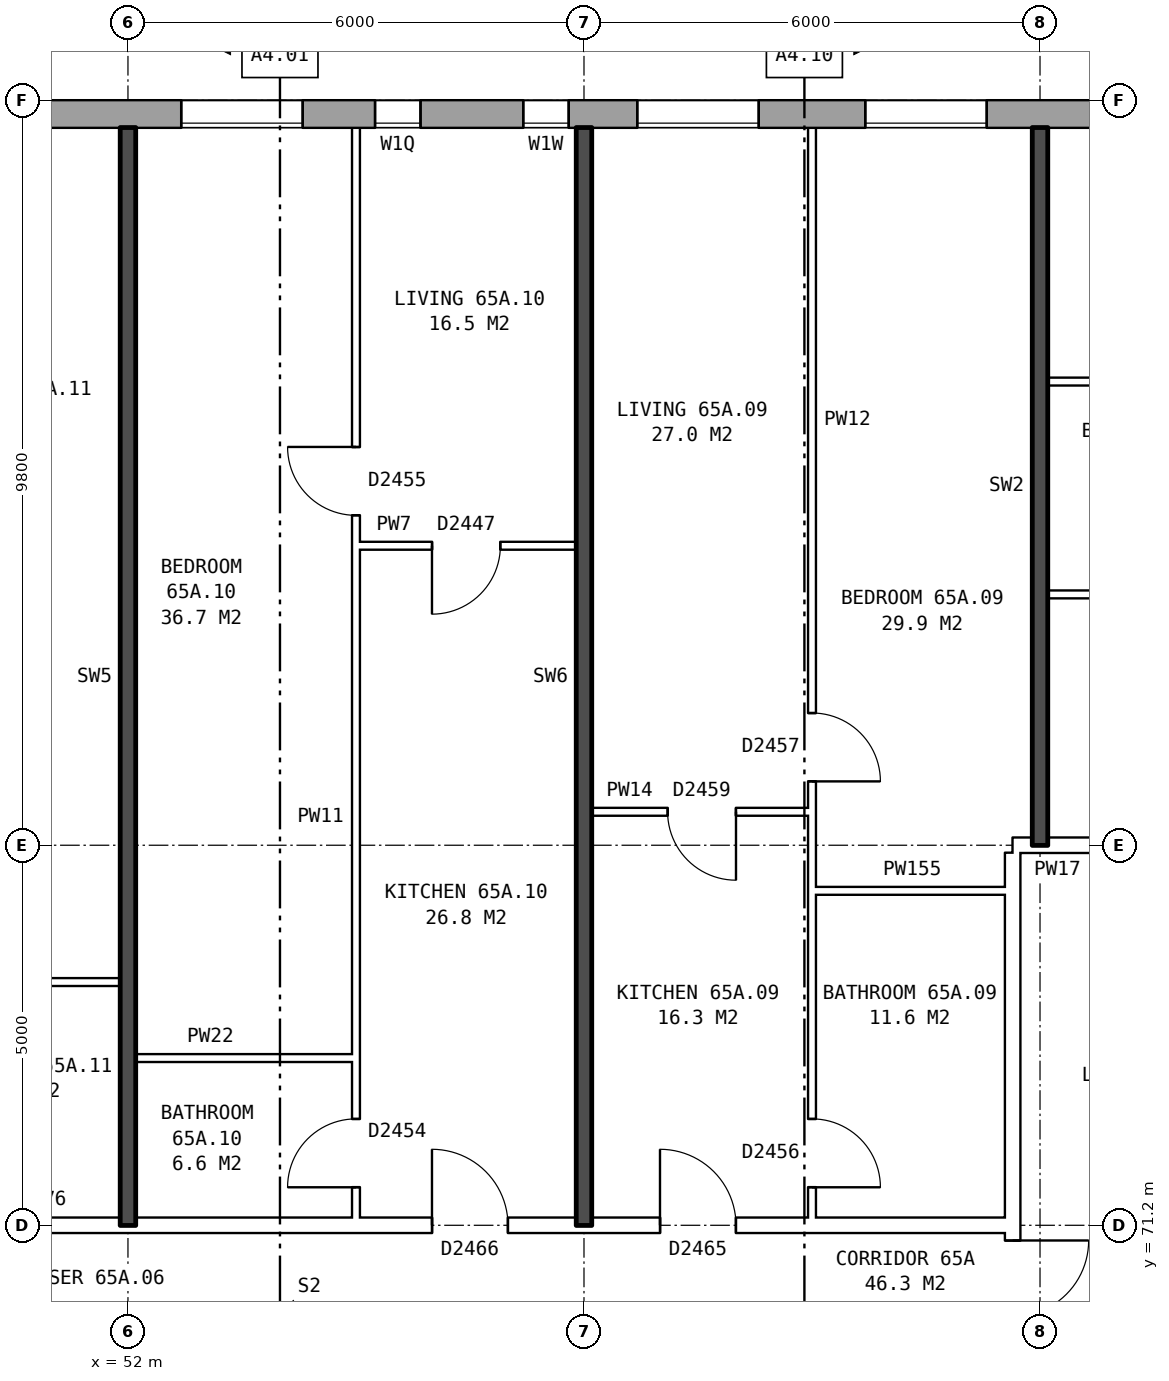
"""IFC4 building model, lengths in metres.
Left out: names, types, materials, properties, quantities, classifications, styles, units other than length and angle.
Written with IfcOpenShell. Run it as: python <this file> out.ifc"""

import sys

from ifc_helpers import new_model, si_unit, direction, frame, frame_2d, origin, place, context, subcontext, project, spatial, rectangle, extrude, element, fill, save


model = new_model("IFC4")
c1 = context("Model", 3, precision=1e-05, world=origin(), true_north=direction((0.0, 1.0)))
c2 = subcontext(c1, "Body", "Model", "MODEL_VIEW")
j1 = project(units=[si_unit("LENGTHUNIT", "METRE"), si_unit("PLANEANGLEUNIT", "RADIAN")], contexts=[c1])
p1 = place(None, origin())
s1 = spatial("IfcSite", under=j1, at=p1, CompositionType="ELEMENT")
p2 = place(p1, origin())
s2 = spatial("IfcBuilding", under=s1, at=p2, CompositionType="ELEMENT")
p3 = place(p2, frame((0.0, 0.0, 230.7)))
s3 = spatial("IfcBuildingStorey", under=s2, at=p3, CompositionType="ELEMENT", Elevation=230.7)
p4 = place(p3, frame((74.95, 85.82, 0.0), z_axis=(0.0, 0.0, 1.0), x_axis=(-1.0, 0.0, 0.0)))
e1 = element("IfcWall", 1, at=p4, inside=s3, PredefinedType="STANDARD", context=c2, shape_type="SweptSolid", body=[
    extrude(rectangle(XDim=39.875, YDim=0.36, at=frame_2d((19.938, 0.0))), origin(), (0.0, 0.0, 1.0), 2.85),
])
p5 = place(p4, frame((2.65, 0.0, 0.8)))
e2 = element("IfcOpeningElement", 2, at=p5, cuts=e1, PredefinedType="OPENING", context=c2, shape_type="SweptSolid", body=[
    extrude(rectangle(XDim=1.6, YDim=1.8, at=frame_2d((0.8, 0.9))), frame((0.0, 0.19, 0.0), z_axis=(0.0, -1.0, 0.0), x_axis=(1.0, 0.0, 0.0)), (0.0, 0.0, 1.0), 0.38),
])
p6 = place(p4, frame((5.65, 0.0, 0.8)))
e3 = element("IfcOpeningElement", 3, at=p6, cuts=e1, PredefinedType="OPENING", context=c2, shape_type="SweptSolid", body=[
    extrude(rectangle(XDim=1.6, YDim=1.8, at=frame_2d((0.8, 0.9))), frame((0.0, 0.19, 0.0), z_axis=(0.0, -1.0, 0.0), x_axis=(1.0, 0.0, 0.0)), (0.0, 0.0, 1.0), 0.38),
])
p7 = place(p4, frame((8.65, 0.0, 0.8)))
e4 = element("IfcOpeningElement", 4, at=p7, cuts=e1, PredefinedType="OPENING", context=c2, shape_type="SweptSolid", body=[
    extrude(rectangle(XDim=1.6, YDim=1.8, at=frame_2d((0.8, 0.9))), frame((0.0, 0.19, 0.0), z_axis=(0.0, -1.0, 0.0), x_axis=(1.0, 0.0, 0.0)), (0.0, 0.0, 1.0), 0.38),
])
p8 = place(p4, frame((11.65, 0.0, 0.8)))
e5 = element("IfcOpeningElement", 5, at=p8, cuts=e1, PredefinedType="OPENING", context=c2, shape_type="SweptSolid", body=[
    extrude(rectangle(XDim=1.6, YDim=1.8, at=frame_2d((0.8, 0.9))), frame((0.0, 0.19, 0.0), z_axis=(0.0, -1.0, 0.0), x_axis=(1.0, 0.0, 0.0)), (0.0, 0.0, 1.0), 0.38),
])
p9 = place(p4, frame((14.65, 0.0, 0.8)))
e6 = element("IfcOpeningElement", 6, at=p9, cuts=e1, PredefinedType="OPENING", context=c2, shape_type="SweptSolid", body=[
    extrude(rectangle(XDim=1.6, YDim=1.8, at=frame_2d((0.8, 0.9))), frame((0.0, 0.19, 0.0), z_axis=(0.0, -1.0, 0.0), x_axis=(1.0, 0.0, 0.0)), (0.0, 0.0, 1.0), 0.38),
])
p10 = place(p4, frame((17.15, 0.0, 1.7)))
e7 = element("IfcOpeningElement", 7, at=p10, cuts=e1, PredefinedType="OPENING", context=c2, shape_type="SweptSolid", body=[
    extrude(rectangle(XDim=0.6, YDim=0.9, at=frame_2d((0.3, 0.45))), frame((0.0, 0.19, 0.0), z_axis=(0.0, -1.0, 0.0), x_axis=(1.0, 0.0, 0.0)), (0.0, 0.0, 1.0), 0.38),
])
p11 = place(p4, frame((20.65, 0.0, 0.8)))
e8 = element("IfcOpeningElement", 8, at=p11, cuts=e1, PredefinedType="OPENING", context=c2, shape_type="SweptSolid", body=[
    extrude(rectangle(XDim=1.6, YDim=1.8, at=frame_2d((0.8, 0.9))), frame((0.0, 0.19, 0.0), z_axis=(0.0, -1.0, 0.0), x_axis=(1.0, 0.0, 0.0)), (0.0, 0.0, 1.0), 0.38),
])
p12 = place(p4, frame((24.7, 0.0, 0.8)))
e9 = element("IfcOpeningElement", 9, at=p12, cuts=e1, PredefinedType="OPENING", context=c2, shape_type="SweptSolid", body=[
    extrude(rectangle(XDim=1.0, YDim=1.8, at=frame_2d((0.5, 0.9))), frame((0.0, 0.19, 0.0), z_axis=(0.0, -1.0, 0.0), x_axis=(1.0, 0.0, 0.0)), (0.0, 0.0, 1.0), 0.38),
])
p13 = place(p4, frame((26.65, 0.0, 0.8)))
e10 = element("IfcOpeningElement", 10, at=p13, cuts=e1, PredefinedType="OPENING", context=c2, shape_type="SweptSolid", body=[
    extrude(rectangle(XDim=1.6, YDim=1.8, at=frame_2d((0.8, 0.9))), frame((0.0, 0.19, 0.0), z_axis=(0.0, -1.0, 0.0), x_axis=(1.0, 0.0, 0.0)), (0.0, 0.0, 1.0), 0.38),
])
p14 = place(p4, frame((29.65, 0.0, 0.8)))
e11 = element("IfcOpeningElement", 11, at=p14, cuts=e1, PredefinedType="OPENING", context=c2, shape_type="SweptSolid", body=[
    extrude(rectangle(XDim=1.6, YDim=1.8, at=frame_2d((0.8, 0.9))), frame((0.0, 0.19, 0.0), z_axis=(0.0, -1.0, 0.0), x_axis=(1.0, 0.0, 0.0)), (0.0, 0.0, 1.0), 0.38),
])
p15 = place(p4, frame((32.65, 0.0, 0.8)))
e12 = element("IfcOpeningElement", 12, at=p15, cuts=e1, PredefinedType="OPENING", context=c2, shape_type="SweptSolid", body=[
    extrude(rectangle(XDim=1.6, YDim=1.8, at=frame_2d((0.8, 0.9))), frame((0.0, 0.19, 0.0), z_axis=(0.0, -1.0, 0.0), x_axis=(1.0, 0.0, 0.0)), (0.0, 0.0, 1.0), 0.38),
])
p16 = place(p4, frame((35.65, 0.0, 0.8)))
e13 = element("IfcOpeningElement", 13, at=p16, cuts=e1, PredefinedType="OPENING", context=c2, shape_type="SweptSolid", body=[
    extrude(rectangle(XDim=1.6, YDim=1.8, at=frame_2d((0.8, 0.9))), frame((0.0, 0.19, 0.0), z_axis=(0.0, -1.0, 0.0), x_axis=(1.0, 0.0, 0.0)), (0.0, 0.0, 1.0), 0.38),
])
p17 = place(p4, frame((19.1, 0.0, 0.8)))
e14 = element("IfcOpeningElement", 14, at=p17, cuts=e1, PredefinedType="OPENING", context=c2, shape_type="SweptSolid", body=[
    extrude(rectangle(XDim=0.6, YDim=1.2, at=frame_2d((0.3, 0.6))), frame((0.0, 0.19, 0.0), z_axis=(0.0, -1.0, 0.0), x_axis=(1.0, 0.0, 0.0)), (0.0, 0.0, 1.0), 0.38),
])
p18 = place(p3, frame((63.64, 63.9, 0.0), z_axis=(0.0, 0.0, 1.0), x_axis=(0.0, 1.0, 0.0)))
e15 = element("IfcWall", 15, at=p18, inside=s3, PredefinedType="PARTITIONING", context=c2, shape_type="SweptSolid", body=[
    extrude(rectangle(XDim=12.2, YDim=0.2, at=frame_2d((6.1, 0.0))), origin(), (0.0, 0.0, 1.0), 2.85),
])
p19 = place(p18, frame((5.1, 0.0, 0.0)))
e16 = element("IfcOpeningElement", 16, at=p19, cuts=e15, PredefinedType="OPENING", context=c2, shape_type="SweptSolid", body=[
    extrude(rectangle(XDim=2.0, YDim=2.1, at=frame_2d((1.0, 1.05))), frame((0.0, 0.11, 0.0), z_axis=(0.0, -1.0, 0.0), x_axis=(1.0, 0.0, 0.0)), (0.0, 0.0, 1.0), 0.22),
])
p20 = place(p3, frame((44.36, 71.2, 0.0), z_axis=(0.0, 0.0, 1.0), x_axis=(1.0, 0.0, 0.0)))
e17 = element("IfcWall", 17, at=p20, inside=s3, PredefinedType="PARTITIONING", context=c2, shape_type="SweptSolid", body=[
    extrude(rectangle(XDim=19.28, YDim=0.2, at=frame_2d((9.64, 0.0))), origin(), (0.0, 0.0, 1.0), 2.85),
])
p21 = place(p20, frame((14.64, 0.0, 0.0)))
e18 = element("IfcOpeningElement", 18, at=p21, cuts=e17, PredefinedType="OPENING", context=c2, shape_type="SweptSolid", body=[
    extrude(rectangle(XDim=1.0, YDim=2.1, at=frame_2d((0.5, 1.05))), frame((0.0, 0.11, 0.0), z_axis=(0.0, -1.0, 0.0), x_axis=(1.0, 0.0, 0.0)), (0.0, 0.0, 1.0), 0.22),
])
p22 = place(p20, frame((11.64, 0.0, 0.0)))
e19 = element("IfcOpeningElement", 19, at=p22, cuts=e17, PredefinedType="OPENING", context=c2, shape_type="SweptSolid", body=[
    extrude(rectangle(XDim=1.0, YDim=2.1, at=frame_2d((0.5, 1.05))), frame((0.0, 0.11, 0.0), z_axis=(0.0, -1.0, 0.0), x_axis=(1.0, 0.0, 0.0)), (0.0, 0.0, 1.0), 0.22),
])
p23 = place(p20, frame((2.64, 0.0, 0.0)))
e20 = element("IfcOpeningElement", 20, at=p23, cuts=e17, PredefinedType="OPENING", context=c2, shape_type="SweptSolid", body=[
    extrude(rectangle(XDim=1.0, YDim=2.1, at=frame_2d((0.5, 1.05))), frame((0.0, 0.11, 0.0), z_axis=(0.0, -1.0, 0.0), x_axis=(1.0, 0.0, 0.0)), (0.0, 0.0, 1.0), 0.22),
])
for number, where, z_axis, x_axis in (
    (21, (52.1, 73.4, 0.0), (0.0, 0.0, 1.0), (1.0, 0.0, 0.0)),
    (22, (49.0, 74.4, 0.0), (0.0, 0.0, 1.0), (1.0, 0.0, 0.0)),
):
    element("IfcWall", number, at=place(p3, frame(where, z_axis=z_axis, x_axis=x_axis)), inside=s3, PredefinedType="PARTITIONING", context=c2, shape_type="SweptSolid", body=[
        extrude(rectangle(XDim=2.9, YDim=0.1, at=frame_2d((1.45, 0.0))), origin(), (0.0, 0.0, 1.0), 2.85),
    ])
p24 = place(p3, frame((61.0, 75.6, 0.0), z_axis=(0.0, 0.0, 1.0), x_axis=(1.0, 0.0, 0.0)))
e23 = element("IfcWall", 23, at=p24, inside=s3, PredefinedType="PARTITIONING", context=c2, shape_type="SweptSolid", body=[
    extrude(rectangle(XDim=2.64, YDim=0.1, at=frame_2d((1.32, 0.0))), origin(), (0.0, 0.0, 1.0), 2.85),
])
p25 = place(p3, frame((63.64, 76.2, 0.0), z_axis=(0.0, 0.0, 1.0), x_axis=(1.0, 0.0, 0.0)))
e24 = element("IfcWall", 24, at=p25, inside=s3, PredefinedType="PARTITIONING", context=c2, shape_type="SweptSolid", body=[
    extrude(rectangle(XDim=3.0, YDim=0.2, at=frame_2d((1.5, 0.0))), origin(), (0.0, 0.0, 1.0), 2.85),
])
p26 = place(p25, frame((1.18, 0.0, 0.0)))
e25 = element("IfcOpeningElement", 25, at=p26, cuts=e24, PredefinedType="OPENING", context=c2, shape_type="SweptSolid", body=[
    extrude(rectangle(XDim=1.0, YDim=2.1, at=frame_2d((0.5, 1.05))), frame((0.0, 0.11, 0.0), z_axis=(0.0, -1.0, 0.0), x_axis=(1.0, 0.0, 0.0)), (0.0, 0.0, 1.0), 0.22),
])
p27 = place(p3, frame((58.1, 76.64, 0.0), z_axis=(0.0, 0.0, 1.0), x_axis=(1.0, 0.0, 0.0)))
e26 = element("IfcWall", 26, at=p27, inside=s3, PredefinedType="PARTITIONING", context=c2, shape_type="SweptSolid", body=[
    extrude(rectangle(XDim=2.9, YDim=0.1, at=frame_2d((1.45, 0.0))), origin(), (0.0, 0.0, 1.0), 2.85),
])
p28 = place(p27, frame((1.0, 0.0, 0.0)))
e27 = element("IfcOpeningElement", 27, at=p28, cuts=e26, PredefinedType="OPENING", context=c2, shape_type="SweptSolid", body=[
    extrude(rectangle(XDim=0.9, YDim=2.1, at=frame_2d((0.45, 1.05))), frame((0.0, 0.06, 0.0), z_axis=(0.0, -1.0, 0.0), x_axis=(1.0, 0.0, 0.0)), (0.0, 0.0, 1.0), 0.12),
])
p29 = place(p3, frame((64.1, 79.5, 0.0), z_axis=(0.0, 0.0, 1.0), x_axis=(1.0, 0.0, 0.0)))
e28 = element("IfcWall", 28, at=p29, inside=s3, PredefinedType="PARTITIONING", context=c2, shape_type="SweptSolid", body=[
    extrude(rectangle(XDim=11.8, YDim=0.1, at=frame_2d((5.9, 0.0))), origin(), (0.0, 0.0, 1.0), 2.85),
])
p30 = place(p29, frame((3.65, 0.0, 0.0)))
e29 = element("IfcOpeningElement", 29, at=p30, cuts=e28, PredefinedType="OPENING", context=c2, shape_type="SweptSolid", body=[
    extrude(rectangle(XDim=0.9, YDim=2.1, at=frame_2d((0.45, 1.05))), frame((0.0, 0.06, 0.0), z_axis=(0.0, -1.0, 0.0), x_axis=(1.0, 0.0, 0.0)), (0.0, 0.0, 1.0), 0.12),
])
p31 = place(p29, frame((0.7, 0.0, 0.0)))
e30 = element("IfcOpeningElement", 30, at=p31, cuts=e28, PredefinedType="OPENING", context=c2, shape_type="SweptSolid", body=[
    extrude(rectangle(XDim=0.9, YDim=2.1, at=frame_2d((0.45, 1.05))), frame((0.0, 0.06, 0.0), z_axis=(0.0, -1.0, 0.0), x_axis=(1.0, 0.0, 0.0)), (0.0, 0.0, 1.0), 0.12),
])
p32 = place(p3, frame((55.0, 80.14, 0.0), z_axis=(0.0, 0.0, 1.0), x_axis=(1.0, 0.0, 0.0)))
e31 = element("IfcWall", 31, at=p32, inside=s3, PredefinedType="PARTITIONING", context=c2, shape_type="SweptSolid", body=[
    extrude(rectangle(XDim=2.9, YDim=0.1, at=frame_2d((1.45, 0.0))), origin(), (0.0, 0.0, 1.0), 2.85),
])
p33 = place(p32, frame((1.0, 0.0, 0.0)))
e32 = element("IfcOpeningElement", 32, at=p33, cuts=e31, PredefinedType="OPENING", context=c2, shape_type="SweptSolid", body=[
    extrude(rectangle(XDim=0.9, YDim=2.1, at=frame_2d((0.45, 1.05))), frame((0.0, 0.06, 0.0), z_axis=(0.0, -1.0, 0.0), x_axis=(1.0, 0.0, 0.0)), (0.0, 0.0, 1.0), 0.12),
])
p34 = place(p3, frame((64.1, 82.3, 0.0), z_axis=(0.0, 0.0, 1.0), x_axis=(1.0, 0.0, 0.0)))
e33 = element("IfcWall", 33, at=p34, inside=s3, PredefinedType="PARTITIONING", context=c2, shape_type="SweptSolid", body=[
    extrude(rectangle(XDim=2.3, YDim=0.1, at=frame_2d((1.15, 0.0))), origin(), (0.0, 0.0, 1.0), 2.85),
])
p35 = place(p3, frame((52.0, 71.2, 0.0), z_axis=(0.0, 0.0, 1.0), x_axis=(0.0, 1.0, 0.0)))
e34 = element("IfcWall", 34, at=p35, inside=s3, PredefinedType="SOLIDWALL", context=c2, shape_type="SweptSolid", body=[
    extrude(rectangle(XDim=14.44, YDim=0.2, at=frame_2d((7.22, 0.0))), origin(), (0.0, 0.0, 1.0), 2.85),
])
p36 = place(p3, frame((55.0, 71.3, 0.0), z_axis=(0.0, 0.0, 1.0), x_axis=(0.0, 1.0, 0.0)))
e35 = element("IfcWall", 35, at=p36, inside=s3, PredefinedType="PARTITIONING", context=c2, shape_type="SweptSolid", body=[
    extrude(rectangle(XDim=14.34, YDim=0.1, at=frame_2d((7.17, 0.0))), origin(), (0.0, 0.0, 1.0), 2.85),
])
p37 = place(p36, frame((9.24, 0.0, 0.0)))
e36 = element("IfcOpeningElement", 36, at=p37, cuts=e35, PredefinedType="OPENING", context=c2, shape_type="SweptSolid", body=[
    extrude(rectangle(XDim=0.9, YDim=2.1, at=frame_2d((0.45, 1.05))), frame((0.0, 0.06, 0.0), z_axis=(0.0, -1.0, 0.0), x_axis=(1.0, 0.0, 0.0)), (0.0, 0.0, 1.0), 0.12),
])
p38 = place(p36, frame((0.4, 0.0, 0.0)))
e37 = element("IfcOpeningElement", 37, at=p38, cuts=e35, PredefinedType="OPENING", context=c2, shape_type="SweptSolid", body=[
    extrude(rectangle(XDim=0.9, YDim=2.1, at=frame_2d((0.45, 1.05))), frame((0.0, 0.06, 0.0), z_axis=(0.0, -1.0, 0.0), x_axis=(1.0, 0.0, 0.0)), (0.0, 0.0, 1.0), 0.12),
])
p39 = place(p3, frame((58.0, 71.2, 0.0), z_axis=(0.0, 0.0, 1.0), x_axis=(0.0, 1.0, 0.0)))
e38 = element("IfcWall", 38, at=p39, inside=s3, PredefinedType="SOLIDWALL", context=c2, shape_type="SweptSolid", body=[
    extrude(rectangle(XDim=14.44, YDim=0.2, at=frame_2d((7.22, 0.0))), origin(), (0.0, 0.0, 1.0), 2.85),
])
p40 = place(p3, frame((61.0, 71.3, 0.0), z_axis=(0.0, 0.0, 1.0), x_axis=(0.0, 1.0, 0.0)))
e39 = element("IfcWall", 39, at=p40, inside=s3, PredefinedType="PARTITIONING", context=c2, shape_type="SweptSolid", body=[
    extrude(rectangle(XDim=14.34, YDim=0.1, at=frame_2d((7.17, 0.0))), origin(), (0.0, 0.0, 1.0), 2.85),
])
p41 = place(p40, frame((5.74, 0.0, 0.0)))
e40 = element("IfcOpeningElement", 40, at=p41, cuts=e39, PredefinedType="OPENING", context=c2, shape_type="SweptSolid", body=[
    extrude(rectangle(XDim=0.9, YDim=2.1, at=frame_2d((0.45, 1.05))), frame((0.0, 0.06, 0.0), z_axis=(0.0, -1.0, 0.0), x_axis=(1.0, 0.0, 0.0)), (0.0, 0.0, 1.0), 0.12),
])
p42 = place(p40, frame((0.4, 0.0, 0.0)))
e41 = element("IfcOpeningElement", 41, at=p42, cuts=e39, PredefinedType="OPENING", context=c2, shape_type="SweptSolid", body=[
    extrude(rectangle(XDim=0.9, YDim=2.1, at=frame_2d((0.45, 1.05))), frame((0.0, 0.06, 0.0), z_axis=(0.0, -1.0, 0.0), x_axis=(1.0, 0.0, 0.0)), (0.0, 0.0, 1.0), 0.12),
])
p43 = place(p3, frame((64.0, 76.2, 0.0), z_axis=(0.0, 0.0, 1.0), x_axis=(0.0, 1.0, 0.0)))
e42 = element("IfcWall", 42, at=p43, inside=s3, PredefinedType="SOLIDWALL", context=c2, shape_type="SweptSolid", body=[
    extrude(rectangle(XDim=9.44, YDim=0.2, at=frame_2d((4.72, 0.0))), origin(), (0.0, 0.0, 1.0), 2.85),
])
p44 = place(p8, origin())
e43 = element("IfcWindow", 43, at=p44, inside=s3, PartitioningType="SINGLE_PANEL", PredefinedType="WINDOW", context=c2, shape_type="SweptSolid", body=[
    extrude(rectangle(XDim=1.6, YDim=1.8, at=frame_2d((0.8, 0.9))), frame((0.0, 0.15, 0.0), z_axis=(0.0, -1.0, 0.0), x_axis=(1.0, 0.0, 0.0)), (0.0, 0.0, 1.0), 0.06),
])
fill(e5, e43)
p45 = place(p9, origin())
e44 = element("IfcWindow", 44, at=p45, inside=s3, PartitioningType="SINGLE_PANEL", PredefinedType="WINDOW", context=c2, shape_type="SweptSolid", body=[
    extrude(rectangle(XDim=1.6, YDim=1.8, at=frame_2d((0.8, 0.9))), frame((0.0, 0.15, 0.0), z_axis=(0.0, -1.0, 0.0), x_axis=(1.0, 0.0, 0.0)), (0.0, 0.0, 1.0), 0.06),
])
fill(e6, e44)
p46 = place(p10, origin())
e45 = element("IfcWindow", 45, at=p46, inside=s3, PartitioningType="SINGLE_PANEL", PredefinedType="WINDOW", context=c2, shape_type="SweptSolid", body=[
    extrude(rectangle(XDim=0.6, YDim=0.9, at=frame_2d((0.3, 0.45))), frame((0.0, 0.15, 0.0), z_axis=(0.0, -1.0, 0.0), x_axis=(1.0, 0.0, 0.0)), (0.0, 0.0, 1.0), 0.06),
])
fill(e7, e45)
p47 = place(p11, origin())
e46 = element("IfcWindow", 46, at=p47, inside=s3, PartitioningType="SINGLE_PANEL", PredefinedType="WINDOW", context=c2, shape_type="SweptSolid", body=[
    extrude(rectangle(XDim=1.6, YDim=1.8, at=frame_2d((0.8, 0.9))), frame((0.0, 0.15, 0.0), z_axis=(0.0, -1.0, 0.0), x_axis=(1.0, 0.0, 0.0)), (0.0, 0.0, 1.0), 0.06),
])
fill(e8, e46)
p48 = place(p19, frame((2.0, 0.0, 0.0), z_axis=(0.0, 0.0, 1.0), x_axis=(-1.0, 0.0, 0.0)))
e47 = element("IfcDoor", 47, at=p48, inside=s3, OperationType="DOUBLE_DOOR_SINGLE_SWING", PredefinedType="DOOR", context=c2, shape_type="SweptSolid", body=[
    extrude(rectangle(XDim=2.0, YDim=2.1, at=frame_2d((1.0, 1.05))), frame((0.0, 0.025, 0.0), z_axis=(0.0, -1.0, 0.0), x_axis=(1.0, 0.0, 0.0)), (0.0, 0.0, 1.0), 0.05),
])
fill(e16, e47)
p49 = place(p41, frame((0.9, 0.0, 0.0), z_axis=(0.0, 0.0, 1.0), x_axis=(-1.0, 0.0, 0.0)))
e48 = element("IfcDoor", 48, at=p49, inside=s3, OperationType="SINGLE_SWING_RIGHT", PredefinedType="DOOR", context=c2, shape_type="SweptSolid", body=[
    extrude(rectangle(XDim=0.9, YDim=2.1, at=frame_2d((0.45, 1.05))), frame((0.0, 0.025, 0.0), z_axis=(0.0, -1.0, 0.0), x_axis=(1.0, 0.0, 0.0)), (0.0, 0.0, 1.0), 0.05),
])
fill(e40, e48)
p50 = place(p21, origin())
e49 = element("IfcDoor", 49, at=p50, inside=s3, OperationType="SINGLE_SWING_LEFT", PredefinedType="DOOR", context=c2, shape_type="SweptSolid", body=[
    extrude(rectangle(XDim=1.0, YDim=2.1, at=frame_2d((0.5, 1.05))), frame((0.0, 0.025, 0.0), z_axis=(0.0, -1.0, 0.0), x_axis=(1.0, 0.0, 0.0)), (0.0, 0.0, 1.0), 0.05),
])
fill(e18, e49)
p51 = place(p28, frame((0.9, 0.0, 0.0), z_axis=(0.0, 0.0, 1.0), x_axis=(-1.0, 0.0, 0.0)))
e50 = element("IfcDoor", 50, at=p51, inside=s3, OperationType="SINGLE_SWING_LEFT", PredefinedType="DOOR", context=c2, shape_type="SweptSolid", body=[
    extrude(rectangle(XDim=0.9, YDim=2.1, at=frame_2d((0.45, 1.05))), frame((0.0, 0.025, 0.0), z_axis=(0.0, -1.0, 0.0), x_axis=(1.0, 0.0, 0.0)), (0.0, 0.0, 1.0), 0.05),
])
fill(e27, e50)
p52 = place(p42, frame((0.9, 0.0, 0.0), z_axis=(0.0, 0.0, 1.0), x_axis=(-1.0, 0.0, 0.0)))
e51 = element("IfcDoor", 51, at=p52, inside=s3, OperationType="SINGLE_SWING_RIGHT", PredefinedType="DOOR", context=c2, shape_type="SweptSolid", body=[
    extrude(rectangle(XDim=0.9, YDim=2.1, at=frame_2d((0.45, 1.05))), frame((0.0, 0.025, 0.0), z_axis=(0.0, -1.0, 0.0), x_axis=(1.0, 0.0, 0.0)), (0.0, 0.0, 1.0), 0.05),
])
fill(e41, e51)
p53 = place(p37, origin())
e52 = element("IfcDoor", 52, at=p53, inside=s3, OperationType="SINGLE_SWING_RIGHT", PredefinedType="DOOR", context=c2, shape_type="SweptSolid", body=[
    extrude(rectangle(XDim=0.9, YDim=2.1, at=frame_2d((0.45, 1.05))), frame((0.0, 0.025, 0.0), z_axis=(0.0, -1.0, 0.0), x_axis=(1.0, 0.0, 0.0)), (0.0, 0.0, 1.0), 0.05),
])
fill(e36, e52)
p54 = place(p22, origin())
e53 = element("IfcDoor", 53, at=p54, inside=s3, OperationType="SINGLE_SWING_LEFT", PredefinedType="DOOR", context=c2, shape_type="SweptSolid", body=[
    extrude(rectangle(XDim=1.0, YDim=2.1, at=frame_2d((0.5, 1.05))), frame((0.0, 0.025, 0.0), z_axis=(0.0, -1.0, 0.0), x_axis=(1.0, 0.0, 0.0)), (0.0, 0.0, 1.0), 0.05),
])
fill(e19, e53)
p55 = place(p33, frame((0.9, 0.0, 0.0), z_axis=(0.0, 0.0, 1.0), x_axis=(-1.0, 0.0, 0.0)))
e54 = element("IfcDoor", 54, at=p55, inside=s3, OperationType="SINGLE_SWING_RIGHT", PredefinedType="DOOR", context=c2, shape_type="SweptSolid", body=[
    extrude(rectangle(XDim=0.9, YDim=2.1, at=frame_2d((0.45, 1.05))), frame((0.0, 0.025, 0.0), z_axis=(0.0, -1.0, 0.0), x_axis=(1.0, 0.0, 0.0)), (0.0, 0.0, 1.0), 0.05),
])
fill(e32, e54)
p56 = place(p38, origin())
e55 = element("IfcDoor", 55, at=p56, inside=s3, OperationType="SINGLE_SWING_LEFT", PredefinedType="DOOR", context=c2, shape_type="SweptSolid", body=[
    extrude(rectangle(XDim=0.9, YDim=2.1, at=frame_2d((0.45, 1.05))), frame((0.0, 0.025, 0.0), z_axis=(0.0, -1.0, 0.0), x_axis=(1.0, 0.0, 0.0)), (0.0, 0.0, 1.0), 0.05),
])
fill(e37, e55)
p57 = place(p17, origin())
e56 = element("IfcWindow", 56, at=p57, inside=s3, PartitioningType="SINGLE_PANEL", PredefinedType="WINDOW", context=c2, shape_type="SweptSolid", body=[
    extrude(rectangle(XDim=0.6, YDim=1.2, at=frame_2d((0.3, 0.6))), frame((0.0, 0.15, 0.0), z_axis=(0.0, -1.0, 0.0), x_axis=(1.0, 0.0, 0.0)), (0.0, 0.0, 1.0), 0.06),
])
fill(e14, e56)
save(model, sys.argv[1])
